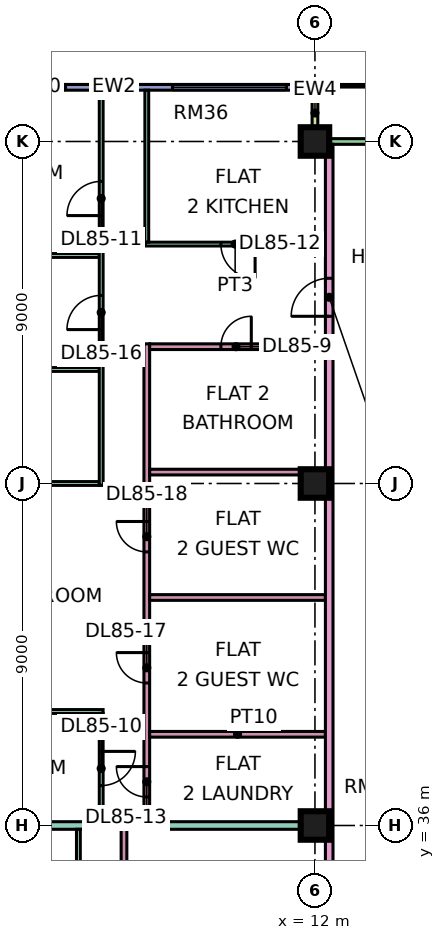
"""IFC4 building model, lengths in metres.
Left out: names, types, materials, properties, quantities, classifications, styles, units other than length and angle.
Written with IfcOpenShell. Run it as: python <this file> out.ifc"""

import sys

from ifc_helpers import new_model, si_unit, direction, frame, frame_2d, origin, origin_2d, place, context, subcontext, project, spatial, rectangle, extrude, element, fill, save


model = new_model("IFC4")
c1 = context("Model", 3, precision=1e-05, world=origin(), true_north=direction((0.0, 1.0)))
c2 = subcontext(c1, "Body", "Model", "MODEL_VIEW")
j1 = project(units=[si_unit("LENGTHUNIT", "METRE"), si_unit("PLANEANGLEUNIT", "RADIAN")], contexts=[c1])
p1 = place(None, origin())
s1 = spatial("IfcSite", under=j1, at=p1, CompositionType="ELEMENT")
p2 = place(p1, origin())
s2 = spatial("IfcBuilding", under=s1, at=p2, CompositionType="ELEMENT")
p3 = place(p2, frame((0.0, 0.0, 365.15)))
s3 = spatial("IfcBuildingStorey", under=s2, at=p3, CompositionType="ELEMENT", Elevation=365.15)
for number, where, z_axis, x_axis in (
    (1, (12.0, 36.0, 0.0), (0.0, 0.0, 1.0), (1.0, 0.0, 0.0)),
    (2, (12.0, 45.0, 0.0), (0.0, 0.0, 1.0), (1.0, 0.0, 0.0)),
    (3, (12.0, 54.0, 0.0), (0.0, 0.0, 1.0), (1.0, 0.0, 0.0)),
):
    element("IfcColumn", number, at=place(p3, frame(where, z_axis=z_axis, x_axis=x_axis)), inside=s3, PredefinedType="COLUMN", context=c2, shape_type="SweptSolid", body=[
        extrude(rectangle(XDim=0.75, YDim=0.75, at=origin_2d()), origin(), (0.0, 0.0, 1.0), 3.75),
    ])
p4 = place(p3, frame((22.425, 54.0, 0.0), z_axis=(0.0, 0.0, 1.0), x_axis=(-1.0, 0.0, 0.0)))
e4 = element("IfcWall", 4, at=p4, inside=s3, PredefinedType="SOLIDWALL", context=c2, shape_type="SweptSolid", body=[
    extrude(rectangle(XDim=10.35, YDim=0.15, at=frame_2d((5.175, 0.0))), origin(), (0.0, 0.0, 1.0), 3.35),
])
p5 = place(p4, frame((1.012, 0.0, 0.45)))
e5 = element("IfcOpeningElement", 5, at=p5, cuts=e4, PredefinedType="OPENING", context=c2, shape_type="SweptSolid", body=[
    extrude(rectangle(XDim=4.8, YDim=2.4, at=frame_2d((2.4, 1.2))), frame((0.0, 0.085, 0.0), z_axis=(0.0, -1.0, 0.0), x_axis=(1.0, 0.0, 0.0)), (0.0, 0.0, 1.0), 0.17),
])
p6 = place(p3, frame((12.0, 55.5, 0.0), z_axis=(0.0, 0.0, 1.0), x_axis=(0.0, -1.0, 0.0)))
e6 = element("IfcWall", 6, at=p6, inside=s3, PredefinedType="SOLIDWALL", context=c2, shape_type="SweptSolid", body=[
    extrude(rectangle(XDim=1.5, YDim=0.15, at=frame_2d((0.75, 0.0))), origin(), (0.0, 0.0, 1.0), 3.35),
])
p7 = place(p3, frame((11.925, 55.425, 0.0), z_axis=(0.0, 0.0, 1.0), x_axis=(-1.0, 0.0, 0.0)))
e7 = element("IfcWall", 7, at=p7, inside=s3, PredefinedType="SOLIDWALL", context=c2, shape_type="SweptSolid", body=[
    extrude(rectangle(XDim=10.425, YDim=0.15, at=frame_2d((5.212, 0.0))), origin(), (0.0, 0.0, 1.0), 3.35),
])
p8 = place(p7, frame((0.675, 0.0, 0.45)))
e8 = element("IfcOpeningElement", 8, at=p8, cuts=e7, PredefinedType="OPENING", context=c2, shape_type="SweptSolid", body=[
    extrude(rectangle(XDim=3.0, YDim=2.4, at=frame_2d((1.5, 1.2))), frame((0.0, 0.085, 0.0), z_axis=(0.0, -1.0, 0.0), x_axis=(1.0, 0.0, 0.0)), (0.0, 0.0, 1.0), 0.17),
])
p9 = place(p7, frame((6.488, 0.0, 0.45)))
e9 = element("IfcOpeningElement", 9, at=p9, cuts=e7, PredefinedType="OPENING", context=c2, shape_type="SweptSolid", body=[
    extrude(rectangle(XDim=3.0, YDim=2.4, at=frame_2d((1.5, 1.2))), frame((0.0, 0.085, 0.0), z_axis=(0.0, -1.0, 0.0), x_axis=(1.0, 0.0, 0.0)), (0.0, 0.0, 1.0), 0.17),
])
p10 = place(p3, frame((0.0, 36.0, 0.0), z_axis=(0.0, 0.0, 1.0), x_axis=(1.0, 0.0, 0.0)))
e10 = element("IfcWall", 10, at=p10, inside=s3, PredefinedType="PARTITIONING", context=c2, shape_type="SweptSolid", body=[
    extrude(rectangle(XDim=12.275, YDim=0.2, at=frame_2d((6.137, 0.0))), origin(), (0.0, 0.0, 1.0), 3.35),
])
p11 = place(p3, frame((0.0, 48.0, 0.0), z_axis=(0.0, 0.0, 1.0), x_axis=(1.0, 0.0, 0.0)))
e11 = element("IfcWall", 11, at=p11, inside=s3, PredefinedType="PARTITIONING", context=c2, shape_type="SweptSolid", body=[
    extrude(rectangle(XDim=6.325, YDim=0.1, at=frame_2d((3.163, 0.0))), origin(), (0.0, 0.0, 1.0), 3.35),
])
p12 = place(p3, frame((-1.35, 51.0, 0.0), z_axis=(0.0, 0.0, 1.0), x_axis=(1.0, 0.0, 0.0)))
e12 = element("IfcWall", 12, at=p12, inside=s3, PredefinedType="PARTITIONING", context=c2, shape_type="SweptSolid", body=[
    extrude(rectangle(XDim=7.675, YDim=0.1, at=frame_2d((3.837, 0.0))), origin(), (0.0, 0.0, 1.0), 3.35),
])
p13 = place(p3, frame((0.074, 39.0, 0.0), z_axis=(0.0, 0.0, 1.0), x_axis=(1.0, 0.0, 0.0)))
e13 = element("IfcWall", 13, at=p13, inside=s3, PredefinedType="PARTITIONING", context=c2, shape_type="SweptSolid", body=[
    extrude(rectangle(XDim=6.351, YDim=0.1, at=frame_2d((3.176, 0.0))), origin(), (0.0, 0.0, 1.0), 3.35),
])
p14 = place(p3, frame((0.074, 45.0, 0.0), z_axis=(0.0, 0.0, 1.0), x_axis=(1.0, 0.0, 0.0)))
e14 = element("IfcWall", 14, at=p14, inside=s3, PredefinedType="PARTITIONING", context=c2, shape_type="SweptSolid", body=[
    extrude(rectangle(XDim=6.251, YDim=0.1, at=frame_2d((3.125, 0.0))), origin(), (0.0, 0.0, 1.0), 3.35),
])
p15 = place(p14, frame((2.301, 0.0, 0.0)))
e15 = element("IfcOpeningElement", 15, at=p15, cuts=e14, PredefinedType="OPENING", context=c2, shape_type="SweptSolid", body=[
    extrude(rectangle(XDim=1.6, YDim=2.1, at=frame_2d((0.8, 1.05))), frame((0.0, 0.06, 0.0), z_axis=(0.0, -1.0, 0.0), x_axis=(1.0, 0.0, 0.0)), (0.0, 0.0, 1.0), 0.12),
])
p16 = place(p3, frame((5.775, 29.95, 0.0), z_axis=(0.0, 0.0, 1.0), x_axis=(0.0, 1.0, 0.0)))
e16 = element("IfcWall", 16, at=p16, inside=s3, PredefinedType="PARTITIONING", context=c2, shape_type="SweptSolid", body=[
    extrude(rectangle(XDim=5.95, YDim=0.1, at=frame_2d((2.975, 0.0))), origin(), (0.0, 0.0, 1.0), 3.35),
])
p17 = place(p16, frame((1.1, 0.0, 0.0)))
e17 = element("IfcOpeningElement", 17, at=p17, cuts=e16, PredefinedType="OPENING", context=c2, shape_type="SweptSolid", body=[
    extrude(rectangle(XDim=0.9, YDim=2.1, at=frame_2d((0.45, 1.05))), frame((0.0, 0.06, 0.0), z_axis=(0.0, -1.0, 0.0), x_axis=(1.0, 0.0, 0.0)), (0.0, 0.0, 1.0), 0.12),
])
p18 = place(p16, frame((4.1, 0.0, 0.0)))
e18 = element("IfcOpeningElement", 18, at=p18, cuts=e16, PredefinedType="OPENING", context=c2, shape_type="SweptSolid", body=[
    extrude(rectangle(XDim=0.9, YDim=2.1, at=frame_2d((0.45, 1.05))), frame((0.0, 0.06, 0.0), z_axis=(0.0, -1.0, 0.0), x_axis=(1.0, 0.0, 0.0)), (0.0, 0.0, 1.0), 0.12),
])
p19 = place(p3, frame((6.375, 36.1, 0.0), z_axis=(0.0, 0.0, 1.0), x_axis=(0.0, 1.0, 0.0)))
e19 = element("IfcWall", 19, at=p19, inside=s3, PredefinedType="PARTITIONING", context=c2, shape_type="SweptSolid", body=[
    extrude(rectangle(XDim=2.85, YDim=0.1, at=frame_2d((1.425, 0.0))), origin(), (0.0, 0.0, 1.0), 3.35),
])
p20 = place(p19, frame((0.95, 0.0, 0.0)))
e20 = element("IfcOpeningElement", 20, at=p20, cuts=e19, PredefinedType="OPENING", context=c2, shape_type="SweptSolid", body=[
    extrude(rectangle(XDim=0.9, YDim=2.1, at=frame_2d((0.45, 1.05))), frame((0.0, 0.06, 0.0), z_axis=(0.0, -1.0, 0.0), x_axis=(1.0, 0.0, 0.0)), (0.0, 0.0, 1.0), 0.12),
])
p21 = place(p3, frame((6.375, 44.95, 0.0), z_axis=(0.0, 0.0, 1.0), x_axis=(0.0, 1.0, 0.0)))
e21 = element("IfcWall", 21, at=p21, inside=s3, PredefinedType="PARTITIONING", context=c2, shape_type="SweptSolid", body=[
    extrude(rectangle(XDim=10.4, YDim=0.1, at=frame_2d((5.2, 0.0))), origin(), (0.0, 0.0, 1.0), 3.35),
])
p22 = place(p21, frame((7.1, 0.0, 0.0)))
e22 = element("IfcOpeningElement", 22, at=p22, cuts=e21, PredefinedType="OPENING", context=c2, shape_type="SweptSolid", body=[
    extrude(rectangle(XDim=0.9, YDim=2.1, at=frame_2d((0.45, 1.05))), frame((0.0, 0.06, 0.0), z_axis=(0.0, -1.0, 0.0), x_axis=(1.0, 0.0, 0.0)), (0.0, 0.0, 1.0), 0.12),
])
p23 = place(p21, frame((4.1, 0.0, 0.0)))
e23 = element("IfcOpeningElement", 23, at=p23, cuts=e21, PredefinedType="OPENING", context=c2, shape_type="SweptSolid", body=[
    extrude(rectangle(XDim=0.9, YDim=2.1, at=frame_2d((0.45, 1.05))), frame((0.0, 0.06, 0.0), z_axis=(0.0, -1.0, 0.0), x_axis=(1.0, 0.0, 0.0)), (0.0, 0.0, 1.0), 0.12),
])
p24 = place(p3, frame((6.975, 26.325, 0.0), z_axis=(0.0, 0.0, 1.0), x_axis=(0.0, 1.0, 0.0)))
e24 = element("IfcWall", 24, at=p24, inside=s3, PredefinedType="PARTITIONING", context=c2, shape_type="SweptSolid", body=[
    extrude(rectangle(XDim=9.575, YDim=0.15, at=frame_2d((4.788, 0.0))), origin(), (0.0, 0.0, 1.0), 3.35),
])
p25 = place(p24, frame((1.125, 0.0, 0.0)))
e25 = element("IfcOpeningElement", 25, at=p25, cuts=e24, PredefinedType="OPENING", context=c2, shape_type="SweptSolid", body=[
    extrude(rectangle(XDim=0.8, YDim=2.1, at=frame_2d((0.4, 1.05))), frame((0.0, 0.085, 0.0), z_axis=(0.0, -1.0, 0.0), x_axis=(1.0, 0.0, 0.0)), (0.0, 0.0, 1.0), 0.17),
])
p26 = place(p24, frame((5.925, 0.0, 0.0)))
e26 = element("IfcOpeningElement", 26, at=p26, cuts=e24, PredefinedType="OPENING", context=c2, shape_type="SweptSolid", body=[
    extrude(rectangle(XDim=0.9, YDim=2.1, at=frame_2d((0.45, 1.05))), frame((0.0, 0.085, 0.0), z_axis=(0.0, -1.0, 0.0), x_axis=(1.0, 0.0, 0.0)), (0.0, 0.0, 1.0), 0.17),
])
p27 = place(p3, frame((7.525, 51.3, 0.0), z_axis=(0.0, 0.0, 1.0), x_axis=(1.0, 0.0, 0.0)))
e27 = element("IfcWall", 27, at=p27, inside=s3, PredefinedType="PARTITIONING", context=c2, shape_type="SweptSolid", body=[
    extrude(rectangle(XDim=4.75, YDim=0.1, at=frame_2d((2.375, 0.0))), origin(), (0.0, 0.0, 1.0), 3.35),
])
p28 = place(p27, frame((2.0, 0.0, 0.0)))
e28 = element("IfcOpeningElement", 28, at=p28, cuts=e27, PredefinedType="OPENING", context=c2, shape_type="SweptSolid", body=[
    extrude(rectangle(XDim=0.9, YDim=2.1, at=frame_2d((0.45, 1.05))), frame((0.0, 0.06, 0.0), z_axis=(0.0, -1.0, 0.0), x_axis=(1.0, 0.0, 0.0)), (0.0, 0.0, 1.0), 0.12),
])
p29 = place(p3, frame((7.575, 36.1, 0.0), z_axis=(0.0, 0.0, 1.0), x_axis=(0.0, 1.0, 0.0)))
e29 = element("IfcWall", 29, at=p29, inside=s3, PredefinedType="PARTITIONING", context=c2, shape_type="SweptSolid", body=[
    extrude(rectangle(XDim=12.575, YDim=0.15, at=frame_2d((6.288, 0.0))), origin(), (0.0, 0.0, 1.0), 3.35),
])
p30 = place(p29, frame((0.65, 0.0, 0.0)))
e30 = element("IfcOpeningElement", 30, at=p30, cuts=e29, PredefinedType="OPENING", context=c2, shape_type="SweptSolid", body=[
    extrude(rectangle(XDim=0.8, YDim=2.1, at=frame_2d((0.4, 1.05))), frame((0.0, 0.085, 0.0), z_axis=(0.0, -1.0, 0.0), x_axis=(1.0, 0.0, 0.0)), (0.0, 0.0, 1.0), 0.17),
])
p31 = place(p29, frame((3.65, 0.0, 0.0)))
e31 = element("IfcOpeningElement", 31, at=p31, cuts=e29, PredefinedType="OPENING", context=c2, shape_type="SweptSolid", body=[
    extrude(rectangle(XDim=0.8, YDim=2.1, at=frame_2d((0.4, 1.05))), frame((0.0, 0.085, 0.0), z_axis=(0.0, -1.0, 0.0), x_axis=(1.0, 0.0, 0.0)), (0.0, 0.0, 1.0), 0.17),
])
p32 = place(p29, frame((7.1, 0.0, 0.0)))
e32 = element("IfcOpeningElement", 32, at=p32, cuts=e29, PredefinedType="OPENING", context=c2, shape_type="SweptSolid", body=[
    extrude(rectangle(XDim=0.8, YDim=2.1, at=frame_2d((0.4, 1.05))), frame((0.0, 0.085, 0.0), z_axis=(0.0, -1.0, 0.0), x_axis=(1.0, 0.0, 0.0)), (0.0, 0.0, 1.0), 0.17),
])
p33 = place(p3, frame((7.575, 51.35, 0.0), z_axis=(0.0, 0.0, 1.0), x_axis=(0.0, 1.0, 0.0)))
e33 = element("IfcWall", 33, at=p33, inside=s3, PredefinedType="PARTITIONING", context=c2, shape_type="SweptSolid", body=[
    extrude(rectangle(XDim=4.0, YDim=0.1, at=frame_2d((2.0, 0.0))), origin(), (0.0, 0.0, 1.0), 3.35),
])
for number, where, z_axis, x_axis in (
    (34, (7.65, 38.4, 0.0), (0.0, 0.0, 1.0), (1.0, 0.0, 0.0)),
    (35, (7.65, 42.0, 0.0), (0.0, 0.0, 1.0), (1.0, 0.0, 0.0)),
    (36, (7.65, 45.3, 0.0), (0.0, 0.0, 1.0), (1.0, 0.0, 0.0)),
):
    element("IfcWall", number, at=place(p3, frame(where, z_axis=z_axis, x_axis=x_axis)), inside=s3, PredefinedType="PARTITIONING", context=c2, shape_type="SweptSolid", body=[
        extrude(rectangle(XDim=4.625, YDim=0.15, at=frame_2d((2.312, 0.0))), origin(), (0.0, 0.0, 1.0), 3.35),
    ])
p34 = place(p3, frame((7.65, 48.6, 0.0), z_axis=(0.0, 0.0, 1.0), x_axis=(1.0, 0.0, 0.0)))
e37 = element("IfcWall", 37, at=p34, inside=s3, PredefinedType="PARTITIONING", context=c2, shape_type="SweptSolid", body=[
    extrude(rectangle(XDim=4.625, YDim=0.15, at=frame_2d((2.312, 0.0))), origin(), (0.0, 0.0, 1.0), 3.35),
])
p35 = place(p34, frame((1.875, 0.0, 0.0)))
e38 = element("IfcOpeningElement", 38, at=p35, cuts=e37, PredefinedType="OPENING", context=c2, shape_type="SweptSolid", body=[
    extrude(rectangle(XDim=0.8, YDim=2.1, at=frame_2d((0.4, 1.05))), frame((0.0, 0.085, 0.0), z_axis=(0.0, -1.0, 0.0), x_axis=(1.0, 0.0, 0.0)), (0.0, 0.0, 1.0), 0.17),
])
p36 = place(p3, frame((12.375, 20.0, 0.0), z_axis=(0.0, 0.0, 1.0), x_axis=(0.0, 1.0, 0.0)))
e39 = element("IfcWall", 39, at=p36, inside=s3, PredefinedType="PARTITIONING", context=c2, shape_type="SweptSolid", body=[
    extrude(rectangle(XDim=33.926, YDim=0.2, at=frame_2d((16.963, 0.0))), origin(), (0.0, 0.0, 1.0), 3.35),
])
p37 = place(p36, frame((29.4, 0.0, 0.0)))
e40 = element("IfcOpeningElement", 40, at=p37, cuts=e39, PredefinedType="OPENING", context=c2, shape_type="SweptSolid", body=[
    extrude(rectangle(XDim=1.0, YDim=2.1, at=frame_2d((0.5, 1.05))), frame((0.0, 0.11, 0.0), z_axis=(0.0, -1.0, 0.0), x_axis=(1.0, 0.0, 0.0)), (0.0, 0.0, 1.0), 0.22),
])
p38 = place(p36, frame((0.6, 0.0, 0.0)))
e41 = element("IfcOpeningElement", 41, at=p38, cuts=e39, PredefinedType="OPENING", context=c2, shape_type="SweptSolid", body=[
    extrude(rectangle(XDim=1.2, YDim=2.1, at=frame_2d((0.6, 1.05))), frame((0.0, 0.11, 0.0), z_axis=(0.0, -1.0, 0.0), x_axis=(1.0, 0.0, 0.0)), (0.0, 0.0, 1.0), 0.22),
])
p39 = place(p36, frame((4.5, 0.0, 0.0)))
e42 = element("IfcOpeningElement", 42, at=p39, cuts=e39, PredefinedType="OPENING", context=c2, shape_type="SweptSolid", body=[
    extrude(rectangle(XDim=1.0, YDim=2.1, at=frame_2d((0.5, 1.05))), frame((0.0, 0.11, 0.0), z_axis=(0.0, -1.0, 0.0), x_axis=(1.0, 0.0, 0.0)), (0.0, 0.0, 1.0), 0.22),
])
p40 = place(p8, origin())
e43 = element("IfcWindow", 43, at=p40, inside=s3, PartitioningType="SINGLE_PANEL", PredefinedType="WINDOW", context=c2, shape_type="SweptSolid", body=[
    extrude(rectangle(XDim=3.0, YDim=2.4, at=frame_2d((1.5, 1.2))), frame((0.0, 0.03, 0.0), z_axis=(0.0, -1.0, 0.0), x_axis=(1.0, 0.0, 0.0)), (0.0, 0.0, 1.0), 0.06),
])
fill(e8, e43)
p41 = place(p9, origin())
e44 = element("IfcWindow", 44, at=p41, inside=s3, PartitioningType="SINGLE_PANEL", PredefinedType="WINDOW", context=c2, shape_type="SweptSolid", body=[
    extrude(rectangle(XDim=3.0, YDim=2.4, at=frame_2d((1.5, 1.2))), frame((0.0, 0.03, 0.0), z_axis=(0.0, -1.0, 0.0), x_axis=(1.0, 0.0, 0.0)), (0.0, 0.0, 1.0), 0.06),
])
fill(e9, e44)
p42 = place(p35, frame((0.8, 0.0, 0.0), z_axis=(0.0, 0.0, 1.0), x_axis=(-1.0, 0.0, 0.0)))
e45 = element("IfcDoor", 45, at=p42, inside=s3, OperationType="SINGLE_SWING_RIGHT", PredefinedType="DOOR", context=c2, shape_type="SweptSolid", body=[
    extrude(rectangle(XDim=0.8, YDim=2.1, at=frame_2d((0.4, 1.05))), frame((0.0, 0.025, 0.0), z_axis=(0.0, -1.0, 0.0), x_axis=(1.0, 0.0, 0.0)), (0.0, 0.0, 1.0), 0.05),
])
fill(e38, e45)
p43 = place(p20, origin())
e46 = element("IfcDoor", 46, at=p43, inside=s3, OperationType="SINGLE_SWING_RIGHT", PredefinedType="DOOR", context=c2, shape_type="SweptSolid", body=[
    extrude(rectangle(XDim=0.9, YDim=2.1, at=frame_2d((0.45, 1.05))), frame((0.0, 0.025, 0.0), z_axis=(0.0, -1.0, 0.0), x_axis=(1.0, 0.0, 0.0)), (0.0, 0.0, 1.0), 0.05),
])
fill(e20, e46)
p44 = place(p22, origin())
e47 = element("IfcDoor", 47, at=p44, inside=s3, OperationType="SINGLE_SWING_LEFT", PredefinedType="DOOR", context=c2, shape_type="SweptSolid", body=[
    extrude(rectangle(XDim=0.9, YDim=2.1, at=frame_2d((0.45, 1.05))), frame((0.0, 0.025, 0.0), z_axis=(0.0, -1.0, 0.0), x_axis=(1.0, 0.0, 0.0)), (0.0, 0.0, 1.0), 0.05),
])
fill(e22, e47)
p45 = place(p28, origin())
e48 = element("IfcDoor", 48, at=p45, inside=s3, OperationType="SINGLE_SWING_RIGHT", PredefinedType="DOOR", context=c2, shape_type="SweptSolid", body=[
    extrude(rectangle(XDim=0.9, YDim=2.1, at=frame_2d((0.45, 1.05))), frame((0.0, 0.025, 0.0), z_axis=(0.0, -1.0, 0.0), x_axis=(1.0, 0.0, 0.0)), (0.0, 0.0, 1.0), 0.05),
])
fill(e28, e48)
p46 = place(p30, frame((0.8, 0.0, 0.0), z_axis=(0.0, 0.0, 1.0), x_axis=(-1.0, 0.0, 0.0)))
e49 = element("IfcDoor", 49, at=p46, inside=s3, OperationType="SINGLE_SWING_RIGHT", PredefinedType="DOOR", context=c2, shape_type="SweptSolid", body=[
    extrude(rectangle(XDim=0.8, YDim=2.1, at=frame_2d((0.4, 1.05))), frame((0.0, 0.025, 0.0), z_axis=(0.0, -1.0, 0.0), x_axis=(1.0, 0.0, 0.0)), (0.0, 0.0, 1.0), 0.05),
])
fill(e30, e49)
p47 = place(p37, origin())
e50 = element("IfcDoor", 50, at=p47, inside=s3, OperationType="SINGLE_SWING_LEFT", PredefinedType="DOOR", context=c2, shape_type="SweptSolid", body=[
    extrude(rectangle(XDim=1.0, YDim=2.1, at=frame_2d((0.5, 1.05))), frame((0.0, 0.025, 0.0), z_axis=(0.0, -1.0, 0.0), x_axis=(1.0, 0.0, 0.0)), (0.0, 0.0, 1.0), 0.05),
])
fill(e40, e50)
p48 = place(p23, origin())
e51 = element("IfcDoor", 51, at=p48, inside=s3, OperationType="SINGLE_SWING_LEFT", PredefinedType="DOOR", context=c2, shape_type="SweptSolid", body=[
    extrude(rectangle(XDim=0.9, YDim=2.1, at=frame_2d((0.45, 1.05))), frame((0.0, 0.025, 0.0), z_axis=(0.0, -1.0, 0.0), x_axis=(1.0, 0.0, 0.0)), (0.0, 0.0, 1.0), 0.05),
])
fill(e23, e51)
p49 = place(p31, frame((0.8, 0.0, 0.0), z_axis=(0.0, 0.0, 1.0), x_axis=(-1.0, 0.0, 0.0)))
e52 = element("IfcDoor", 52, at=p49, inside=s3, OperationType="SINGLE_SWING_RIGHT", PredefinedType="DOOR", context=c2, shape_type="SweptSolid", body=[
    extrude(rectangle(XDim=0.8, YDim=2.1, at=frame_2d((0.4, 1.05))), frame((0.0, 0.025, 0.0), z_axis=(0.0, -1.0, 0.0), x_axis=(1.0, 0.0, 0.0)), (0.0, 0.0, 1.0), 0.05),
])
fill(e31, e52)
p50 = place(p32, frame((0.8, 0.0, 0.0), z_axis=(0.0, 0.0, 1.0), x_axis=(-1.0, 0.0, 0.0)))
e53 = element("IfcDoor", 53, at=p50, inside=s3, OperationType="SINGLE_SWING_RIGHT", PredefinedType="DOOR", context=c2, shape_type="SweptSolid", body=[
    extrude(rectangle(XDim=0.8, YDim=2.1, at=frame_2d((0.4, 1.05))), frame((0.0, 0.025, 0.0), z_axis=(0.0, -1.0, 0.0), x_axis=(1.0, 0.0, 0.0)), (0.0, 0.0, 1.0), 0.05),
])
fill(e32, e53)
save(model, sys.argv[1])
